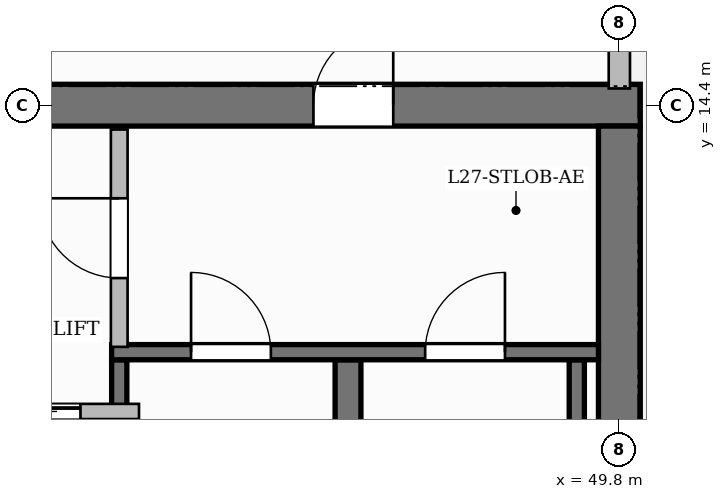
"""IFC4 building model, lengths in metres.
Left out: names, types, materials, properties, quantities, classifications, styles, units other than length and angle.
Written with IfcOpenShell. Run it as: python <this file> out.ifc"""

import sys

from ifc_helpers import new_model, si_unit, direction, frame, frame_2d, origin, place, context, subcontext, project, spatial, rectangle, extrude, source, transform, mapped, element, fill, save


model = new_model("IFC4")
c1 = context("Model", 3, precision=1e-05, world=origin(), true_north=direction((0.0, 1.0)))
c2 = subcontext(c1, "Body", "Model", "MODEL_VIEW")
j1 = project(units=[si_unit("LENGTHUNIT", "METRE"), si_unit("PLANEANGLEUNIT", "RADIAN")], contexts=[c1])
p1 = place(None, origin())
s1 = spatial("IfcSite", under=j1, at=p1, CompositionType="ELEMENT")
p2 = place(p1, origin())
s2 = spatial("IfcBuilding", under=s1, at=p2, CompositionType="ELEMENT")
p3 = place(p2, frame((0.0, 0.0, 111.8)))
s3 = spatial("IfcBuildingStorey", under=s2, at=p3, CompositionType="ELEMENT", Elevation=111.8)
p4 = place(p3, frame((34.525, 14.4, 0.0), z_axis=(0.0, 0.0, 1.0), x_axis=(1.0, 0.0, 0.0)))
e1 = element("IfcWall", 1, at=p4, inside=s3, PredefinedType="SHEAR", context=c2, shape_type="SweptSolid", body=[
    extrude(rectangle(XDim=15.55, YDim=0.55, at=frame_2d((7.775, 0.0))), origin(), (0.0, 0.0, 1.0), 3.7),
])
p5 = place(p4, frame((5.405, 0.0, 0.0)))
e2 = element("IfcOpeningElement", 2, at=p5, cuts=e1, PredefinedType="OPENING", context=c2, shape_type="SweptSolid", body=[
    extrude(rectangle(XDim=1.5, YDim=2.2, at=frame_2d((0.75, 1.1))), frame((0.0, 0.285, 0.0), z_axis=(0.0, -1.0, 0.0), x_axis=(1.0, 0.0, 0.0)), (0.0, 0.0, 1.0), 0.57),
])
p6 = place(p4, frame((1.62, 0.0, 0.0)))
e3 = element("IfcOpeningElement", 3, at=p6, cuts=e1, PredefinedType="OPENING", context=c2, shape_type="SweptSolid", body=[
    extrude(rectangle(XDim=1.05, YDim=2.15, at=frame_2d((0.525, 1.075))), frame((0.0, 0.285, 0.0), z_axis=(0.0, -1.0, 0.0), x_axis=(1.0, 0.0, 0.0)), (0.0, 0.0, 1.0), 0.57),
])
p7 = place(p4, frame((11.25, 0.0, 0.0)))
e4 = element("IfcOpeningElement", 4, at=p7, cuts=e1, PredefinedType="OPENING", context=c2, shape_type="SweptSolid", body=[
    extrude(rectangle(XDim=1.05, YDim=2.15, at=frame_2d((0.525, 1.075))), frame((0.0, 0.285, 0.0), z_axis=(0.0, -1.0, 0.0), x_axis=(1.0, 0.0, 0.0)), (0.0, 0.0, 1.0), 0.57),
])
p8 = place(p3, frame((49.8, 3.875, 0.0), z_axis=(0.0, 0.0, 1.0), x_axis=(0.0, 1.0, 0.0)))
e5 = element("IfcWall", 5, at=p8, inside=s3, PredefinedType="SHEAR", context=c2, shape_type="SweptSolid", body=[
    extrude(rectangle(XDim=10.25, YDim=0.55, at=frame_2d((5.125, 0.0))), origin(), (0.0, 0.0, 1.0), 3.7),
])
p9 = place(p3, frame((43.22, 4.1, 0.0), z_axis=(0.0, 0.0, 1.0), x_axis=(0.0, 1.0, 0.0)))
e6 = element("IfcWall", 6, at=p9, inside=s3, PredefinedType="SHEAR", context=c2, shape_type="SweptSolid", body=[
    extrude(rectangle(XDim=6.95, YDim=0.2, at=frame_2d((3.475, 0.0))), origin(), (0.0, 0.0, 1.0), 3.7),
])
p10 = place(p3, frame((46.23, 4.1, 0.0), z_axis=(0.0, 0.0, 1.0), x_axis=(0.0, 1.0, 0.0)))
e7 = element("IfcWall", 7, at=p10, inside=s3, PredefinedType="SHEAR", context=c2, shape_type="SweptSolid", body=[
    extrude(rectangle(XDim=6.95, YDim=0.34, at=frame_2d((3.475, 0.0))), origin(), (0.0, 0.0, 1.0), 3.7),
])
p11 = place(p3, frame((49.24, 4.1, 0.0), z_axis=(0.0, 0.0, 1.0), x_axis=(0.0, 1.0, 0.0)))
e8 = element("IfcWall", 8, at=p11, inside=s3, PredefinedType="SHEAR", context=c2, shape_type="SweptSolid", body=[
    extrude(rectangle(XDim=6.95, YDim=0.2, at=frame_2d((3.475, 0.0))), origin(), (0.0, 0.0, 1.0), 3.7),
])
p12 = place(p3, frame((43.12, 11.15, 0.0), z_axis=(0.0, 0.0, 1.0), x_axis=(1.0, 0.0, 0.0)))
e9 = element("IfcWall", 9, at=p12, inside=s3, PredefinedType="SHEAR", context=c2, shape_type="SweptSolid", body=[
    extrude(rectangle(XDim=6.405, YDim=0.2, at=frame_2d((3.202, 0.0))), origin(), (0.0, 0.0, 1.0), 3.7),
])
p13 = place(p12, frame((1.045, 0.0, 0.0)))
e10 = element("IfcOpeningElement", 10, at=p13, cuts=e9, PredefinedType="OPENING", context=c2, shape_type="SweptSolid", body=[
    extrude(rectangle(XDim=1.05, YDim=2.2, at=frame_2d((0.525, 1.1))), frame((0.0, 0.11, 0.0), z_axis=(0.0, -1.0, 0.0), x_axis=(1.0, 0.0, 0.0)), (0.0, 0.0, 1.0), 0.22),
])
p14 = place(p12, frame((4.125, 0.0, 0.0)))
e11 = element("IfcOpeningElement", 11, at=p14, cuts=e9, PredefinedType="OPENING", context=c2, shape_type="SweptSolid", body=[
    extrude(rectangle(XDim=1.05, YDim=2.2, at=frame_2d((0.525, 1.1))), frame((0.0, 0.11, 0.0), z_axis=(0.0, -1.0, 0.0), x_axis=(1.0, 0.0, 0.0)), (0.0, 0.0, 1.0), 0.22),
])
p15 = place(p3, frame((43.22, 11.22, 0.0), z_axis=(0.0, 0.0, 1.0), x_axis=(0.0, 1.0, 0.0)))
e12 = element("IfcWall", 12, at=p15, inside=s3, PredefinedType="PARTITIONING", context=c2, shape_type="SweptSolid", body=[
    extrude(rectangle(XDim=2.86, YDim=0.22, at=frame_2d((1.43, 0.0))), origin(), (0.0, 0.0, 1.0), 3.45),
])
p16 = place(p15, frame((0.905, 0.0, 0.0)))
e13 = element("IfcOpeningElement", 13, at=p16, cuts=e12, PredefinedType="OPENING", context=c2, shape_type="SweptSolid", body=[
    extrude(rectangle(XDim=1.05, YDim=2.15, at=frame_2d((0.525, 1.075))), frame((0.0, 0.12, 0.0), z_axis=(0.0, -1.0, 0.0), x_axis=(1.0, 0.0, 0.0)), (0.0, 0.0, 1.0), 0.24),
])
p17 = place(p3, frame((40.84, 10.37, 0.0), z_axis=(0.0, 0.0, 1.0), x_axis=(1.0, 0.0, 0.0)))
e14 = element("IfcWall", 14, at=p17, inside=s3, PredefinedType="PARTITIONING", context=c2, shape_type="SweptSolid", body=[
    extrude(rectangle(XDim=2.64, YDim=0.2, at=frame_2d((1.32, 0.0))), origin(), (0.0, 0.0, 1.0), 3.45),
])
p18 = place(p17, frame((0.77, 0.0, 0.0)))
e15 = element("IfcOpeningElement", 15, at=p18, cuts=e14, PredefinedType="OPENING", context=c2, shape_type="SweptSolid", body=[
    extrude(rectangle(XDim=1.1, YDim=2.2, at=frame_2d((0.55, 1.1))), frame((0.0, 0.11, 0.0), z_axis=(0.0, -1.0, 0.0), x_axis=(1.0, 0.0, 0.0)), (0.0, 0.0, 1.0), 0.22),
])
p19 = place(p3, frame((49.8, 14.62, 0.0), z_axis=(0.0, 0.0, 1.0), x_axis=(0.0, 1.0, 0.0)))
e16 = element("IfcWall", 16, at=p19, inside=s3, PredefinedType="SOLIDWALL", context=c2, shape_type="SweptSolid", body=[
    extrude(rectangle(XDim=6.93, YDim=0.28, at=frame_2d((3.465, 0.0))), origin(), (0.0, 0.0, 1.0), 2.935),
])
p20 = place(p19, frame((0.745, 0.0, 0.8)))
e17 = element("IfcOpeningElement", 17, at=p20, cuts=e16, PredefinedType="OPENING", context=c2, shape_type="SweptSolid", body=[
    extrude(rectangle(XDim=1.8, YDim=1.85, at=frame_2d((0.9, 0.925))), frame((0.0, 0.15, 0.0), z_axis=(0.0, -1.0, 0.0), x_axis=(1.0, 0.0, 0.0)), (0.0, 0.0, 1.0), 0.3),
])
p21 = place(p19, frame((3.659, 0.0, 0.8)))
e18 = element("IfcOpeningElement", 18, at=p21, cuts=e16, PredefinedType="OPENING", context=c2, shape_type="SweptSolid", body=[
    extrude(rectangle(XDim=1.8, YDim=1.85, at=frame_2d((0.9, 0.925))), frame((0.0, 0.15, 0.0), z_axis=(0.0, -1.0, 0.0), x_axis=(1.0, 0.0, 0.0)), (0.0, 0.0, 1.0), 0.3),
])
m1 = source(origin(), c2, "Body", "SweptSolid", [
    extrude(rectangle(XDim=1.05, YDim=2.2, at=frame_2d((0.525, 1.1))), frame((0.0, 0.025, 0.0), z_axis=(0.0, -1.0, 0.0), x_axis=(1.0, 0.0, 0.0)), (0.0, 0.0, 1.0), 0.05),
])
p22 = place(p13, origin())
e19 = element("IfcDoor", 19, at=p22, inside=s3, OperationType="SINGLE_SWING_LEFT", PredefinedType="DOOR", context=c2, shape_type="MappedRepresentation", body=[
    mapped(m1, transform((0.0, 0.0, 0.0), scale=1.0)),
])
fill(e10, e19)
p23 = place(p14, origin())
e20 = element("IfcDoor", 20, at=p23, inside=s3, OperationType="SINGLE_SWING_RIGHT", PredefinedType="DOOR", context=c2, shape_type="MappedRepresentation", body=[
    mapped(m1, transform((0.0, 0.0, 0.0), scale=1.0)),
])
fill(e11, e20)
m2 = source(origin(), c2, "Body", "SweptSolid", [
    extrude(rectangle(XDim=1.05, YDim=2.15, at=frame_2d((0.525, 1.075))), frame((0.0, 0.025, 0.0), z_axis=(0.0, -1.0, 0.0), x_axis=(1.0, 0.0, 0.0)), (0.0, 0.0, 1.0), 0.05),
])
p24 = place(p16, origin())
e21 = element("IfcDoor", 21, at=p24, inside=s3, OperationType="SINGLE_SWING_RIGHT", PredefinedType="DOOR", context=c2, shape_type="MappedRepresentation", body=[
    mapped(m2, transform((0.0, 0.0, 0.0), scale=1.0)),
])
fill(e13, e21)
p25 = place(p7, origin())
e22 = element("IfcDoor", 22, at=p25, inside=s3, OperationType="SINGLE_SWING_RIGHT", PredefinedType="DOOR", context=c2, shape_type="MappedRepresentation", body=[
    mapped(m2, transform((0.0, 0.0, 0.0), scale=1.0)),
])
fill(e4, e22)
m3 = source(origin(), c2, "Body", "SweptSolid", [
    extrude(rectangle(XDim=1.1, YDim=2.2, at=frame_2d((0.55, 1.1))), frame((0.0, 0.025, 0.0), z_axis=(0.0, -1.0, 0.0), x_axis=(1.0, 0.0, 0.0)), (0.0, 0.0, 1.0), 0.05),
])
p26 = place(p18, origin())
e23 = element("IfcDoor", 23, at=p26, inside=s3, OperationType="SLIDING_TO_LEFT", PredefinedType="DOOR", context=c2, shape_type="MappedRepresentation", body=[
    mapped(m3, transform((0.0, 0.0, 0.0), scale=1.0)),
])
fill(e15, e23)
save(model, sys.argv[1])
